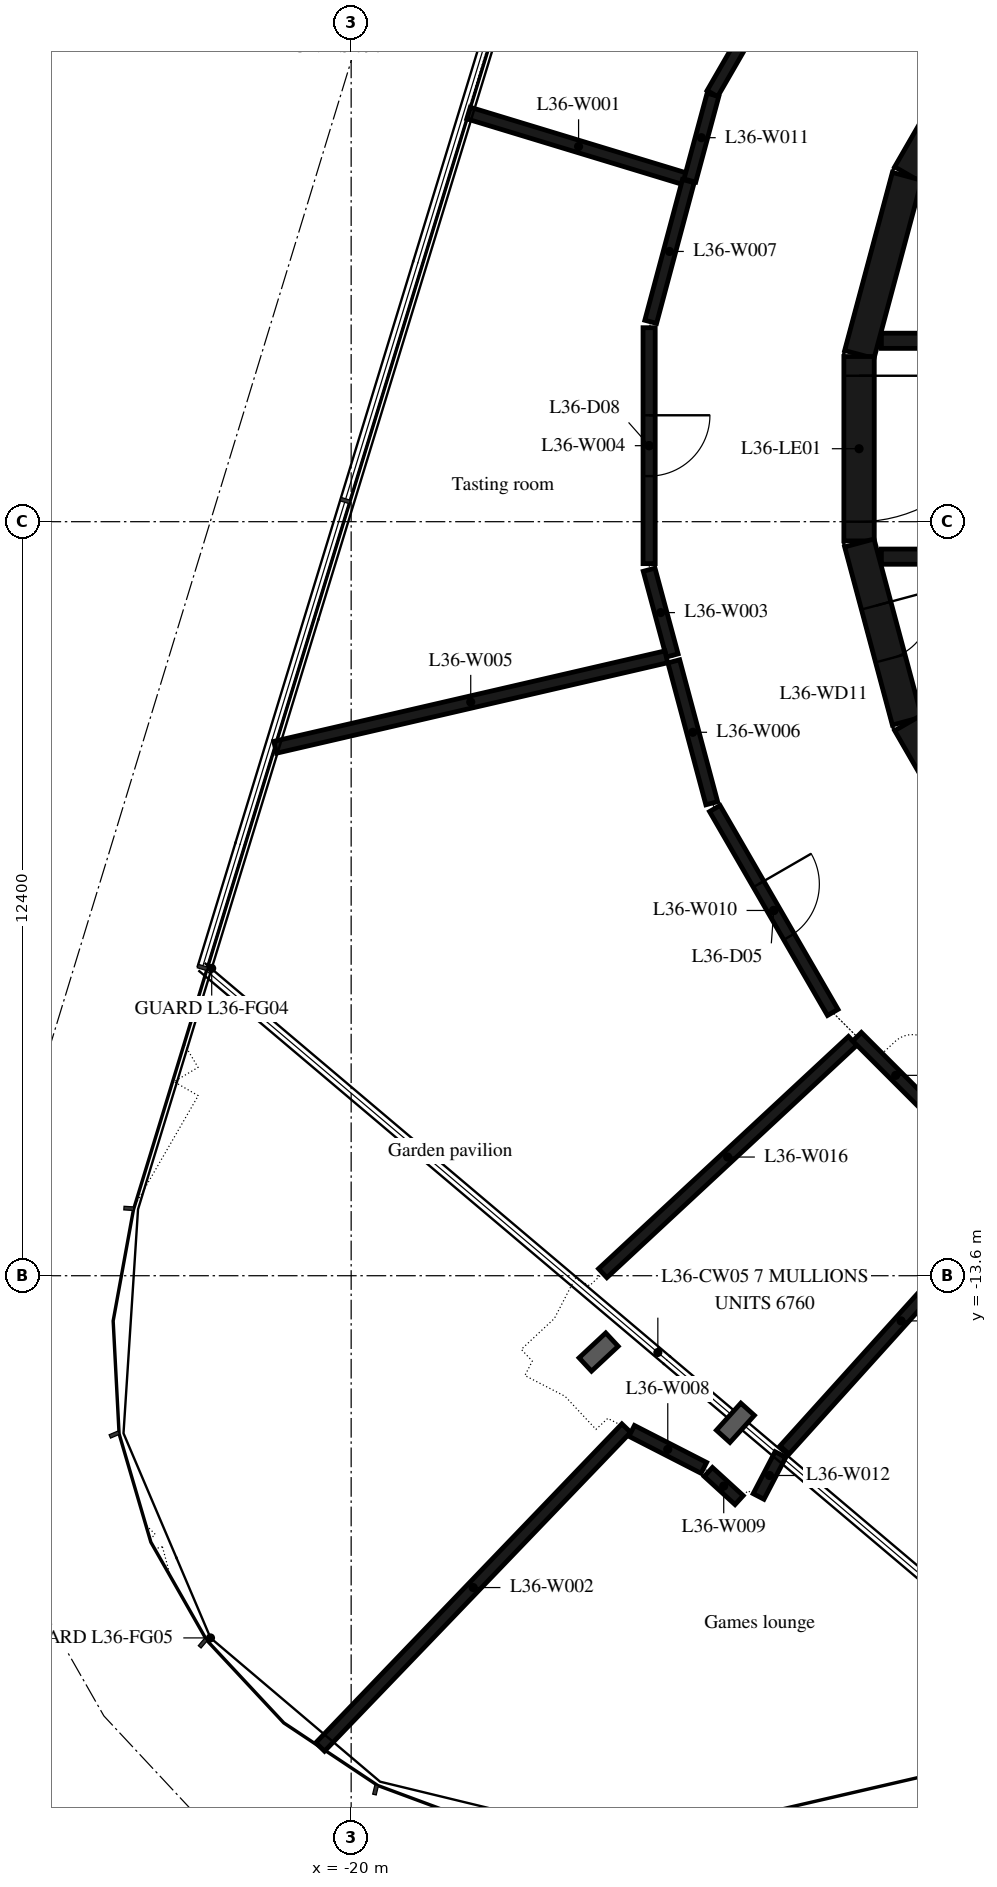
"""IFC4 building model, lengths in metres.
Left out: names, types, materials, properties, quantities, classifications, styles, units other than length and angle.
Written with IfcOpenShell. Run it as: python <this file> out.ifc"""

import sys

from ifc_helpers import new_model, si_unit, direction, frame, frame_2d, origin, place, context, subcontext, project, spatial, rectangle, extrude, element, fill, save


model = new_model("IFC4")
c1 = context("Model", 3, precision=1e-05, world=origin(), true_north=direction((0.0, 1.0)))
c2 = subcontext(c1, "Body", "Model", "MODEL_VIEW")
j1 = project(units=[si_unit("LENGTHUNIT", "METRE"), si_unit("PLANEANGLEUNIT", "RADIAN")], contexts=[c1])
p1 = place(None, origin())
s1 = spatial("IfcSite", under=j1, at=p1, CompositionType="ELEMENT")
p2 = place(p1, origin())
s2 = spatial("IfcBuilding", under=s1, at=p2, CompositionType="ELEMENT")
p3 = place(p2, frame((0.0, 0.0, 144.9)))
s3 = spatial("IfcBuildingStorey", under=s2, at=p3, CompositionType="ELEMENT", Elevation=144.9)
for number, where, z_axis, x_axis in (
    (1, (-9.329, 7.137, 0.0), (0.0, 0.0, 1.0), (-0.5, -0.866, 0.0)),
    (2, (-10.858, 4.479, 0.0), (0.0, 0.0, 1.0), (-0.259, -0.966, 0.0)),
):
    element("IfcWall", number, at=place(p3, frame(where, z_axis=z_axis, x_axis=x_axis)), inside=s3, PredefinedType="SHEAR", context=c2, shape_type="SweptSolid", body=[
        extrude(rectangle(XDim=3.033, YDim=0.5, at=frame_2d((1.516, 0.0))), origin(), (0.0, 0.0, 1.0), 6.35),
    ])
p4 = place(p3, frame((-11.647, 1.516, 0.0), z_axis=(0.0, 0.0, 1.0), x_axis=(0.0, -1.0, 0.0)))
e3 = element("IfcWall", 3, at=p4, inside=s3, PredefinedType="SHEAR", context=c2, shape_type="SweptSolid", body=[
    extrude(rectangle(XDim=3.033, YDim=0.5, at=frame_2d((1.516, 0.0))), origin(), (0.0, 0.0, 1.0), 6.35),
])
p5 = place(p4, frame((0.316, 0.0, 0.0)))
e4 = element("IfcOpeningElement", 4, at=p5, cuts=e3, PredefinedType="OPENING", context=c2, shape_type="SweptSolid", body=[
    extrude(rectangle(XDim=2.4, YDim=2.1, at=frame_2d((1.2, 1.05))), frame((0.0, 0.26, 0.0), z_axis=(0.0, -1.0, 0.0), x_axis=(1.0, 0.0, 0.0)), (0.0, 0.0, 1.0), 0.52),
])
p6 = place(p3, frame((-11.643, -1.55, 0.0), z_axis=(0.0, 0.0, 1.0), x_axis=(0.258734743916, -0.965948410781, 0.0)))
e5 = element("IfcWall", 5, at=p6, inside=s3, PredefinedType="SHEAR", context=c2, shape_type="SweptSolid", body=[
    extrude(rectangle(XDim=3.033, YDim=0.5, at=frame_2d((1.516, 0.0))), origin(), (0.0, 0.0, 1.0), 6.35),
])
p7 = place(p6, frame((1.066, 0.0, 0.0)))
e6 = element("IfcOpeningElement", 6, at=p7, cuts=e5, PredefinedType="OPENING", context=c2, shape_type="SweptSolid", body=[
    extrude(rectangle(XDim=0.9, YDim=2.1, at=frame_2d((0.45, 1.05))), frame((0.0, 0.26, 0.0), z_axis=(0.0, -1.0, 0.0), x_axis=(1.0, 0.0, 0.0)), (0.0, 0.0, 1.0), 0.52),
])
p8 = place(p3, frame((-10.845, -4.51, 0.0), z_axis=(0.0, 0.0, 1.0), x_axis=(0.500087131594, -0.865975092491, 0.0)))
e7 = element("IfcWall", 7, at=p8, inside=s3, PredefinedType="SHEAR", context=c2, shape_type="SweptSolid", body=[
    extrude(rectangle(XDim=3.033, YDim=0.5, at=frame_2d((1.516, 0.0))), origin(), (0.0, 0.0, 1.0), 6.35),
])
p9 = place(p3, frame((-11.28, 1.775, 0.0), z_axis=(0.0, 0.0, 1.0), x_axis=(1.0, 0.0, 0.0)))
e8 = element("IfcWall", 8, at=p9, inside=s3, PredefinedType="SHEAR", context=c2, shape_type="SweptSolid", body=[
    extrude(rectangle(XDim=14.38, YDim=0.25, at=frame_2d((7.19, 0.0))), origin(), (0.0, 0.0, 1.0), 6.35),
])
p10 = place(p9, frame((10.83, 0.0, 0.0)))
e9 = element("IfcOpeningElement", 9, at=p10, cuts=e8, PredefinedType="OPENING", context=c2, shape_type="SweptSolid", body=[
    extrude(rectangle(XDim=0.9, YDim=2.1, at=frame_2d((0.45, 1.05))), frame((0.0, 0.135, 0.0), z_axis=(0.0, -1.0, 0.0), x_axis=(1.0, 0.0, 0.0)), (0.0, 0.0, 1.0), 0.27),
])
p11 = place(p9, frame((12.98, 0.0, 0.0)))
e10 = element("IfcOpeningElement", 10, at=p11, cuts=e8, PredefinedType="OPENING", context=c2, shape_type="SweptSolid", body=[
    extrude(rectangle(XDim=0.9, YDim=2.1, at=frame_2d((0.45, 1.05))), frame((0.0, 0.135, 0.0), z_axis=(0.0, -1.0, 0.0), x_axis=(1.0, 0.0, 0.0)), (0.0, 0.0, 1.0), 0.27),
])
p12 = place(p3, frame((-11.28, -1.775, 0.0), z_axis=(0.0, 0.0, 1.0), x_axis=(1.0, 0.0, 0.0)))
e11 = element("IfcWall", 11, at=p12, inside=s3, PredefinedType="SHEAR", context=c2, shape_type="SweptSolid", body=[
    extrude(rectangle(XDim=14.38, YDim=0.25, at=frame_2d((7.19, 0.0))), origin(), (0.0, 0.0, 1.0), 6.35),
])
p13 = place(p12, frame((2.03, 0.0, 0.0)))
e12 = element("IfcOpeningElement", 12, at=p13, cuts=e11, PredefinedType="OPENING", context=c2, shape_type="SweptSolid", body=[
    extrude(rectangle(XDim=1.3, YDim=2.1, at=frame_2d((0.65, 1.05))), frame((0.0, 0.135, 0.0), z_axis=(0.0, -1.0, 0.0), x_axis=(1.0, 0.0, 0.0)), (0.0, 0.0, 1.0), 0.27),
])
p14 = place(p12, frame((4.18, 0.0, 0.0)))
e13 = element("IfcOpeningElement", 13, at=p14, cuts=e11, PredefinedType="OPENING", context=c2, shape_type="SweptSolid", body=[
    extrude(rectangle(XDim=1.3, YDim=2.1, at=frame_2d((0.65, 1.05))), frame((0.0, 0.135, 0.0), z_axis=(0.0, -1.0, 0.0), x_axis=(1.0, 0.0, 0.0)), (0.0, 0.0, 1.0), 0.27),
])
p15 = place(p12, frame((7.605, 0.0, 0.0)))
e14 = element("IfcOpeningElement", 14, at=p15, cuts=e11, PredefinedType="OPENING", context=c2, shape_type="SweptSolid", body=[
    extrude(rectangle(XDim=0.9, YDim=2.1, at=frame_2d((0.45, 1.05))), frame((0.0, 0.135, 0.0), z_axis=(0.0, -1.0, 0.0), x_axis=(1.0, 0.0, 0.0)), (0.0, 0.0, 1.0), 0.27),
])
p16 = place(p12, frame((10.83, 0.0, 0.0)))
e15 = element("IfcOpeningElement", 15, at=p16, cuts=e11, PredefinedType="OPENING", context=c2, shape_type="SweptSolid", body=[
    extrude(rectangle(XDim=0.9, YDim=2.1, at=frame_2d((0.45, 1.05))), frame((0.0, 0.135, 0.0), z_axis=(0.0, -1.0, 0.0), x_axis=(1.0, 0.0, 0.0)), (0.0, 0.0, 1.0), 0.27),
])
p17 = place(p12, frame((12.98, 0.0, 0.0)))
e16 = element("IfcOpeningElement", 16, at=p17, cuts=e11, PredefinedType="OPENING", context=c2, shape_type="SweptSolid", body=[
    extrude(rectangle(XDim=0.9, YDim=2.1, at=frame_2d((0.45, 1.05))), frame((0.0, 0.135, 0.0), z_axis=(0.0, -1.0, 0.0), x_axis=(1.0, 0.0, 0.0)), (0.0, 0.0, 1.0), 0.27),
])
p18 = place(p3, frame((-18.07, 5.52, 0.0), z_axis=(0.0, 0.0, 1.0), x_axis=(0.956797265316, -0.290755899482, 0.0)))
e17 = element("IfcWall", 17, at=p18, inside=s3, PredefinedType="PARTITIONING", context=c2, shape_type="SweptSolid", body=[
    extrude(rectangle(XDim=3.784, YDim=0.2, at=frame_2d((1.892, 0.0))), origin(), (0.0, 0.0, 1.0), 6.35),
])
p19 = place(p3, frame((-15.476, -16.106, 0.0), z_axis=(0.0, 0.0, 1.0), x_axis=(-0.6925353236, -0.72138396542, 0.0)))
e18 = element("IfcWall", 18, at=p19, inside=s3, PredefinedType="PARTITIONING", context=c2, shape_type="SweptSolid", body=[
    extrude(rectangle(XDim=7.27, YDim=0.2, at=frame_2d((3.635, 0.0))), origin(), (0.0, 0.0, 1.0), 6.35),
])
p20 = place(p3, frame((-15.1, -1.99, 0.0), z_axis=(0.0, 0.0, 1.0), x_axis=(0.260315217094, -0.965523685753, 0.0)))
e19 = element("IfcWall", 19, at=p20, inside=s3, PredefinedType="PARTITIONING", context=c2, shape_type="SweptSolid", body=[
    extrude(rectangle(XDim=1.46, YDim=0.2, at=frame_2d((0.73, 0.0))), origin(), (0.0, 0.0, 1.0), 6.35),
])
p21 = place(p3, frame((-15.1, 1.99, 0.0), z_axis=(0.0, 0.0, 1.0), x_axis=(0.0, -1.0, 0.0)))
e20 = element("IfcWall", 20, at=p21, inside=s3, PredefinedType="PARTITIONING", context=c2, shape_type="SweptSolid", body=[
    extrude(rectangle(XDim=3.88, YDim=0.2, at=frame_2d((1.94, 0.0))), origin(), (0.0, 0.0, 1.0), 6.35),
])
p22 = place(p21, frame((1.44, 0.0, 0.0)))
e21 = element("IfcOpeningElement", 21, at=p22, cuts=e20, PredefinedType="OPENING", context=c2, shape_type="SweptSolid", body=[
    extrude(rectangle(XDim=1.0, YDim=2.1, at=frame_2d((0.5, 1.05))), frame((0.0, 0.11, 0.0), z_axis=(0.0, -1.0, 0.0), x_axis=(1.0, 0.0, 0.0)), (0.0, 0.0, 1.0), 0.22),
])
p23 = place(p3, frame((-14.817, -3.423, 0.0), z_axis=(0.0, 0.0, 1.0), x_axis=(-0.974296379066, -0.225269984108, 0.0)))
e22 = element("IfcWall", 22, at=p23, inside=s3, PredefinedType="PARTITIONING", context=c2, shape_type="SweptSolid", body=[
    extrude(rectangle(XDim=6.602, YDim=0.2, at=frame_2d((3.301, 0.0))), origin(), (0.0, 0.0, 1.0), 6.35),
])
p24 = place(p3, frame((-14.694, -3.497, 0.0), z_axis=(0.0, 0.0, 1.0), x_axis=(0.258341997177, -0.966053524653, 0.0)))
e23 = element("IfcWall", 23, at=p24, inside=s3, PredefinedType="PARTITIONING", context=c2, shape_type="SweptSolid", body=[
    extrude(rectangle(XDim=2.416, YDim=0.2, at=frame_2d((1.208, 0.0))), origin(), (0.0, 0.0, 1.0), 6.35),
])
p25 = place(p3, frame((-14.455, 4.402, 0.0), z_axis=(0.0, 0.0, 1.0), x_axis=(-0.258467872824, -0.966019854205, 0.0)))
e24 = element("IfcWall", 24, at=p25, inside=s3, PredefinedType="PARTITIONING", context=c2, shape_type="SweptSolid", body=[
    extrude(rectangle(XDim=2.396, YDim=0.2, at=frame_2d((1.198, 0.0))), origin(), (0.0, 0.0, 1.0), 6.35),
])
p26 = place(p3, frame((-14.2, -16.76, 0.0), z_axis=(0.0, 0.0, 1.0), x_axis=(-0.88987844473, 0.456197713283, 0.0)))
e25 = element("IfcWall", 25, at=p26, inside=s3, PredefinedType="PARTITIONING", context=c2, shape_type="SweptSolid", body=[
    extrude(rectangle(XDim=1.334, YDim=0.2, at=frame_2d((0.667, 0.0))), origin(), (0.0, 0.0, 1.0), 6.35),
])
p27 = place(p3, frame((-14.126, -16.827, 0.0), z_axis=(0.0, 0.0, 1.0), x_axis=(0.73808453576, -0.674708246631, 0.0)))
e26 = element("IfcWall", 26, at=p27, inside=s3, PredefinedType="PARTITIONING", context=c2, shape_type="SweptSolid", body=[
    extrude(rectangle(XDim=0.686, YDim=0.2, at=frame_2d((0.343, 0.0))), origin(), (0.0, 0.0, 1.0), 6.35),
])
p28 = place(p3, frame((-14.02, -5.917, 0.0), z_axis=(0.0, 0.0, 1.0), x_axis=(0.500733182901, -0.865601686425, 0.0)))
e27 = element("IfcWall", 27, at=p28, inside=s3, PredefinedType="PARTITIONING", context=c2, shape_type="SweptSolid", body=[
    extrude(rectangle(XDim=3.874, YDim=0.2, at=frame_2d((1.937, 0.0))), origin(), (0.0, 0.0, 1.0), 6.35),
])
p29 = place(p28, frame((1.437, 0.0, 0.0)))
e28 = element("IfcOpeningElement", 28, at=p29, cuts=e27, PredefinedType="OPENING", context=c2, shape_type="SweptSolid", body=[
    extrude(rectangle(XDim=1.0, YDim=2.1, at=frame_2d((0.5, 1.05))), frame((0.0, 0.11, 0.0), z_axis=(0.0, -1.0, 0.0), x_axis=(1.0, 0.0, 0.0)), (0.0, 0.0, 1.0), 0.22),
])
p30 = place(p3, frame((-14.05, 5.82, 0.0), z_axis=(0.0, 0.0, 1.0), x_axis=(-0.260117352512, -0.965577010353, 0.0)))
e29 = element("IfcWall", 29, at=p30, inside=s3, PredefinedType="PARTITIONING", context=c2, shape_type="SweptSolid", body=[
    extrude(rectangle(XDim=1.46, YDim=0.2, at=frame_2d((0.73, 0.0))), origin(), (0.0, 0.0, 1.0), 6.35),
])
p31 = place(p3, frame((-13.3, -17.23, 0.0), z_axis=(0.0, 0.0, 1.0), x_axis=(0.462705370769, 0.886512120538, 0.0)))
e30 = element("IfcWall", 30, at=p31, inside=s3, PredefinedType="PARTITIONING", context=c2, shape_type="SweptSolid", body=[
    extrude(rectangle(XDim=0.778, YDim=0.2, at=frame_2d((0.389, 0.0))), origin(), (0.0, 0.0, 1.0), 6.35),
])
p32 = place(p3, frame((-12.873, -16.466, 0.0), z_axis=(0.0, 0.0, 1.0), x_axis=(0.670098193638, 0.742272464048, 0.0)))
e31 = element("IfcWall", 31, at=p32, inside=s3, PredefinedType="PARTITIONING", context=c2, shape_type="SweptSolid", body=[
    extrude(rectangle(XDim=5.72, YDim=0.2, at=frame_2d((2.86, 0.0))), origin(), (0.0, 0.0, 1.0), 6.35),
])
p33 = place(p3, frame((-12.13, 9.183, 0.0), z_axis=(0.0, 0.0, 1.0), x_axis=(-0.499988873232, -0.866031827731, 0.0)))
e32 = element("IfcWall", 32, at=p33, inside=s3, PredefinedType="PARTITIONING", context=c2, shape_type="SweptSolid", body=[
    extrude(rectangle(XDim=3.86, YDim=0.2, at=frame_2d((1.93, 0.0))), origin(), (0.0, 0.0, 1.0), 6.35),
])
p34 = place(p33, frame((1.43, 0.0, 0.0)))
e33 = element("IfcOpeningElement", 33, at=p34, cuts=e32, PredefinedType="OPENING", context=c2, shape_type="SweptSolid", body=[
    extrude(rectangle(XDim=1.0, YDim=2.1, at=frame_2d((0.5, 1.05))), frame((0.0, 0.11, 0.0), z_axis=(0.0, -1.0, 0.0), x_axis=(1.0, 0.0, 0.0)), (0.0, 0.0, 1.0), 0.22),
])
p35 = place(p3, frame((-11.753, -9.738, 0.0), z_axis=(0.0, 0.0, 1.0), x_axis=(-0.732435443259, -0.680836486579, 0.0)))
e34 = element("IfcWall", 34, at=p35, inside=s3, PredefinedType="PARTITIONING", context=c2, shape_type="SweptSolid", body=[
    extrude(rectangle(XDim=5.612, YDim=0.2, at=frame_2d((2.806, 0.0))), origin(), (0.0, 0.0, 1.0), 6.35),
])
p36 = place(p3, frame((-11.68, -9.67, 0.0), z_axis=(0.0, 0.0, 1.0), x_axis=(0.707106781187, -0.707106781187, 0.0)))
e35 = element("IfcWall", 35, at=p36, inside=s3, PredefinedType="PARTITIONING", context=c2, shape_type="SweptSolid", body=[
    extrude(rectangle(XDim=1.796, YDim=0.2, at=frame_2d((0.898, 0.0))), origin(), (0.0, 0.0, 1.0), 6.35),
])
p37 = place(p5, origin())
e36 = element("IfcDoor", 36, at=p37, inside=s3, OperationType="DOUBLE_DOOR_SINGLE_SWING", PredefinedType="DOOR", context=c2, shape_type="SweptSolid", body=[
    extrude(rectangle(XDim=2.4, YDim=2.1, at=frame_2d((1.2, 1.05))), frame((0.0, 0.025, 0.0), z_axis=(0.0, -1.0, 0.0), x_axis=(1.0, 0.0, 0.0)), (0.0, 0.0, 1.0), 0.05),
])
fill(e4, e36)
p38 = place(p7, origin())
e37 = element("IfcDoor", 37, at=p38, inside=s3, OperationType="SINGLE_SWING_RIGHT", PredefinedType="DOOR", context=c2, shape_type="SweptSolid", body=[
    extrude(rectangle(XDim=0.9, YDim=2.1, at=frame_2d((0.45, 1.05))), frame((0.0, 0.025, 0.0), z_axis=(0.0, -1.0, 0.0), x_axis=(1.0, 0.0, 0.0)), (0.0, 0.0, 1.0), 0.05),
])
fill(e6, e37)
p39 = place(p29, origin())
e38 = element("IfcDoor", 38, at=p39, inside=s3, OperationType="SINGLE_SWING_LEFT", PredefinedType="DOOR", context=c2, shape_type="SweptSolid", body=[
    extrude(rectangle(XDim=1.0, YDim=2.1, at=frame_2d((0.5, 1.05))), frame((0.0, 0.025, 0.0), z_axis=(0.0, -1.0, 0.0), x_axis=(1.0, 0.0, 0.0)), (0.0, 0.0, 1.0), 0.05),
])
fill(e28, e38)
p40 = place(p22, origin())
e39 = element("IfcDoor", 39, at=p40, inside=s3, OperationType="SINGLE_SWING_LEFT", PredefinedType="DOOR", context=c2, shape_type="SweptSolid", body=[
    extrude(rectangle(XDim=1.0, YDim=2.1, at=frame_2d((0.5, 1.05))), frame((0.0, 0.025, 0.0), z_axis=(0.0, -1.0, 0.0), x_axis=(1.0, 0.0, 0.0)), (0.0, 0.0, 1.0), 0.05),
])
fill(e21, e39)
save(model, sys.argv[1])
